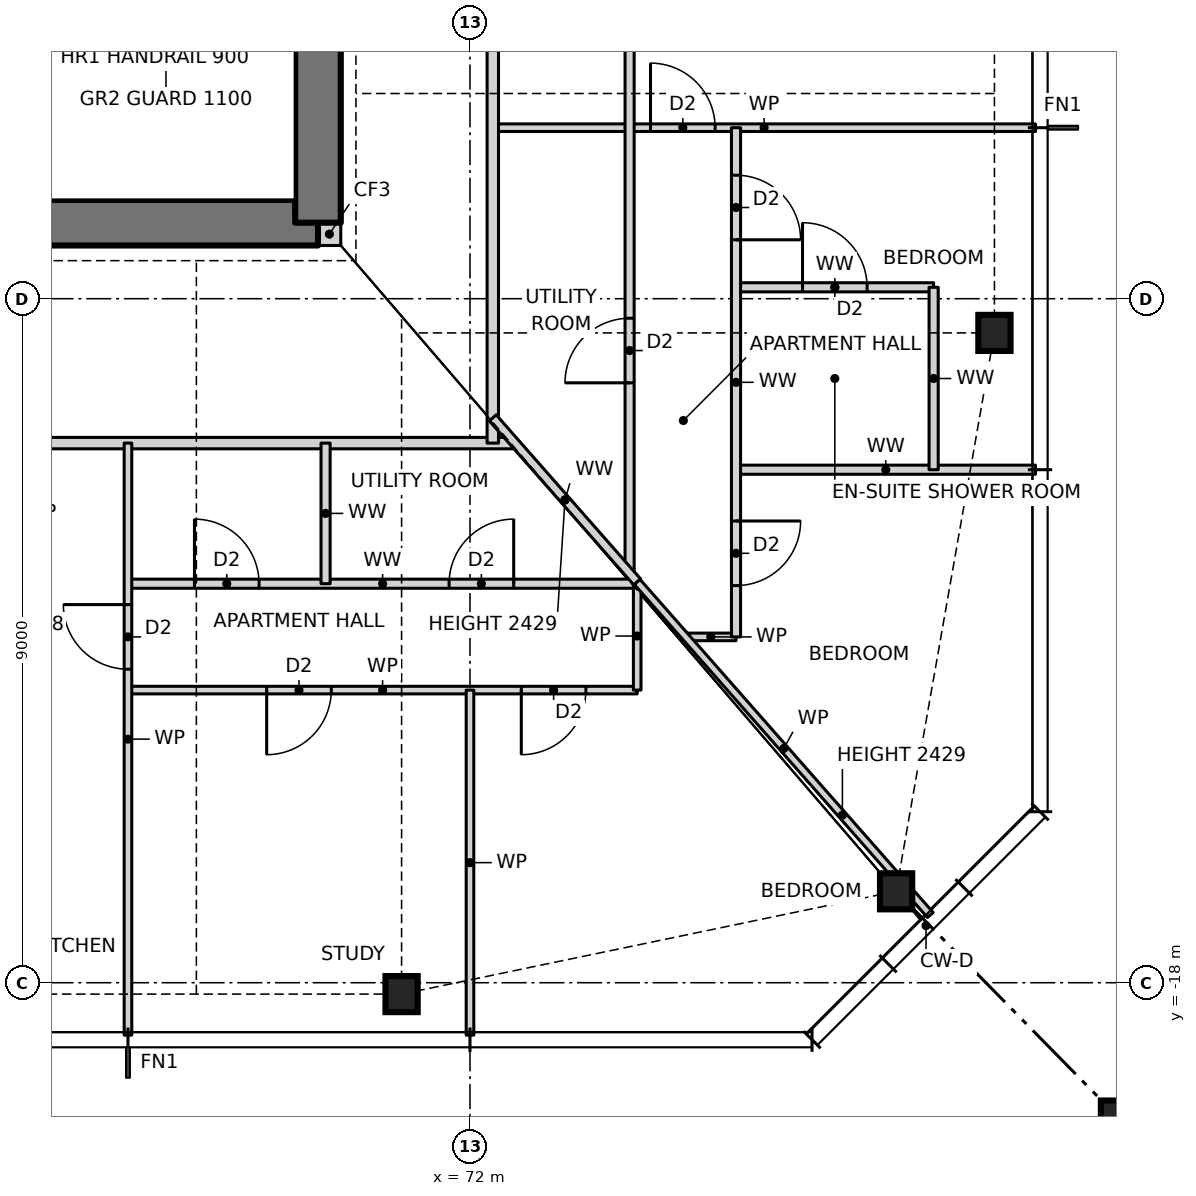
"""IFC4 building model, lengths in metres.
Left out: names, types, materials, properties, quantities, classifications, styles, units other than length and angle.
Written with IfcOpenShell. Run it as: python <this file> out.ifc"""

import sys

from ifc_helpers import new_model, si_unit, direction, frame, frame_2d, origin, origin_2d, place, context, subcontext, project, spatial, rectangle, hollow_rectangle, i_section, extrude, element, fill, save


model = new_model("IFC4")
c1 = context("Model", 3, precision=1e-05, world=origin(), true_north=direction((0.0, 1.0)))
c2 = subcontext(c1, "Body", "Model", "MODEL_VIEW")
j1 = project(units=[si_unit("LENGTHUNIT", "METRE"), si_unit("PLANEANGLEUNIT", "RADIAN")], contexts=[c1])
p1 = place(None, origin())
s1 = spatial("IfcSite", under=j1, at=p1, CompositionType="ELEMENT")
p2 = place(p1, origin())
s2 = spatial("IfcBuilding", under=s1, at=p2, CompositionType="ELEMENT")
p3 = place(p2, frame((0.0, 0.0, 60.5)))
s3 = spatial("IfcBuildingStorey", under=s2, at=p3, CompositionType="ELEMENT", Elevation=60.5)
for number, where, z_axis, x_axis in (
    (1, (71.1, -18.15, 0.0), (0.0, 0.0, 1.0), (1.0, 0.0, 0.0)),
    (2, (77.606, -16.797, 0.0), (0.0, 0.0, 1.0), (1.0, 0.0, 0.0)),
    (3, (78.9, -9.45, 0.0), (0.0, 0.0, 1.0), (1.0, 0.0, 0.0)),
):
    element("IfcColumn", number, at=place(p3, frame(where, z_axis=z_axis, x_axis=x_axis)), inside=s3, PredefinedType="COLUMN", context=c2, shape_type="SweptSolid", body=[
        extrude(i_section(OverallWidth=0.424, OverallDepth=0.475, WebThickness=0.048, FlangeThickness=0.077, at=origin_2d()), origin(), (0.0, 0.0, 1.0), 3.5),
    ])
p4 = place(p3, frame((80.9, -20.15, 0.0), z_axis=(0.0, 0.0, 1.0), x_axis=(1.0, 0.0, 0.0)))
e4 = element("IfcColumn", 4, at=p4, inside=s3, PredefinedType="COLUMN", context=c2, shape_type="SweptSolid", body=[
    extrude(hollow_rectangle(XDim=1.2, YDim=1.2, WallThickness=0.07, at=origin_2d()), origin(), (0.0, 0.0, 1.0), 3.5),
])
p5 = place(p3, frame((70.0, -8.15, 0.0), z_axis=(0.0, 0.0, 1.0), x_axis=(1.0, 0.0, 0.0)))
e5 = element("IfcWall", 5, at=p5, inside=s3, PredefinedType="SOLIDWALL", context=c2, shape_type="SweptSolid", body=[
    extrude(rectangle(XDim=0.3, YDim=0.3, at=frame_2d((0.15, 0.0))), origin(), (0.0, 0.0, 1.0), 3.5),
])
p6 = place(p3, frame((56.0, -8.0, 0.0), z_axis=(0.0, 0.0, 1.0), x_axis=(1.0, 0.0, 0.0)))
e6 = element("IfcWall", 6, at=p6, inside=s3, PredefinedType="SHEAR", context=c2, shape_type="SweptSolid", body=[
    extrude(rectangle(XDim=14.0, YDim=0.6, at=frame_2d((7.0, 0.0))), origin(), (0.0, 0.0, 1.0), 3.5),
])
p7 = place(p6, frame((2.7, 0.0, 0.0)))
e7 = element("IfcOpeningElement", 7, at=p7, cuts=e6, PredefinedType="OPENING", context=c2, shape_type="SweptSolid", body=[
    extrude(rectangle(XDim=0.9, YDim=2.1, at=frame_2d((0.45, 1.05))), frame((0.0, 0.31, 0.0), z_axis=(0.0, -1.0, 0.0), x_axis=(1.0, 0.0, 0.0)), (0.0, 0.0, 1.0), 0.62),
])
p8 = place(p6, frame((7.7, 0.0, 0.0)))
e8 = element("IfcOpeningElement", 8, at=p8, cuts=e6, PredefinedType="OPENING", context=c2, shape_type="SweptSolid", body=[
    extrude(rectangle(XDim=0.9, YDim=2.1, at=frame_2d((0.45, 1.05))), frame((0.0, 0.31, 0.0), z_axis=(0.0, -1.0, 0.0), x_axis=(1.0, 0.0, 0.0)), (0.0, 0.0, 1.0), 0.62),
])
p9 = place(p3, frame((70.0, -8.0, 0.0), z_axis=(0.0, 0.0, 1.0), x_axis=(0.0, 1.0, 0.0)))
e9 = element("IfcWall", 9, at=p9, inside=s3, PredefinedType="SHEAR", context=c2, shape_type="SweptSolid", body=[
    extrude(rectangle(XDim=16.0, YDim=0.6, at=frame_2d((8.0, 0.0))), origin(), (0.0, 0.0, 1.0), 3.5),
])
p10 = place(p9, frame((7.5, 0.0, 0.0)))
e10 = element("IfcOpeningElement", 10, at=p10, cuts=e9, PredefinedType="OPENING", context=c2, shape_type="SweptSolid", body=[
    extrude(rectangle(XDim=1.0, YDim=2.1, at=frame_2d((0.5, 1.05))), frame((0.0, 0.31, 0.0), z_axis=(0.0, -1.0, 0.0), x_axis=(1.0, 0.0, 0.0)), (0.0, 0.0, 1.0), 0.62),
])
p11 = place(p3, frame((67.5, -14.15, 0.0), z_axis=(0.0, 0.0, 1.0), x_axis=(1.0, 0.0, 0.0)))
e11 = element("IfcWall", 11, at=p11, inside=s3, PredefinedType="PARTITIONING", context=c2, shape_type="SweptSolid", body=[
    extrude(rectangle(XDim=6.7, YDim=0.1, at=frame_2d((3.35, 0.0))), origin(), (0.0, 0.0, 1.0), 3.27),
])
p12 = place(p11, frame((1.825, 0.0, 0.0)))
e12 = element("IfcOpeningElement", 12, at=p12, cuts=e11, PredefinedType="OPENING", context=c2, shape_type="SweptSolid", body=[
    extrude(rectangle(XDim=0.85, YDim=2.1, at=frame_2d((0.425, 1.05))), frame((0.0, 0.06, 0.0), z_axis=(0.0, -1.0, 0.0), x_axis=(1.0, 0.0, 0.0)), (0.0, 0.0, 1.0), 0.12),
])
p13 = place(p11, frame((5.175, 0.0, 0.0)))
e13 = element("IfcOpeningElement", 13, at=p13, cuts=e11, PredefinedType="OPENING", context=c2, shape_type="SweptSolid", body=[
    extrude(rectangle(XDim=0.85, YDim=2.1, at=frame_2d((0.425, 1.05))), frame((0.0, 0.06, 0.0), z_axis=(0.0, -1.0, 0.0), x_axis=(1.0, 0.0, 0.0)), (0.0, 0.0, 1.0), 0.12),
])
p14 = place(p3, frame((74.836, -13.45, 0.0), z_axis=(0.0, 0.0, 1.0), x_axis=(1.0, 0.0, 0.0)))
e14 = element("IfcWall", 14, at=p14, inside=s3, PredefinedType="PARTITIONING", context=c2, shape_type="SweptSolid", body=[
    extrude(rectangle(XDim=0.664, YDim=0.1, at=frame_2d((0.332, 0.0))), origin(), (0.0, 0.0, 1.0), 3.27),
])
p15 = place(p3, frame((67.5, -12.75, 0.0), z_axis=(0.0, 0.0, 1.0), x_axis=(1.0, 0.0, 0.0)))
e15 = element("IfcWall", 15, at=p15, inside=s3, PredefinedType="PARTITIONING", context=c2, shape_type="SweptSolid", body=[
    extrude(rectangle(XDim=6.7, YDim=0.12, at=frame_2d((3.35, 0.0))), origin(), (0.0, 0.0, 1.0), 3.27),
])
p16 = place(p15, frame((0.875, 0.0, 0.0)))
e16 = element("IfcOpeningElement", 16, at=p16, cuts=e15, PredefinedType="OPENING", context=c2, shape_type="SweptSolid", body=[
    extrude(rectangle(XDim=0.85, YDim=2.1, at=frame_2d((0.425, 1.05))), frame((0.0, 0.07, 0.0), z_axis=(0.0, -1.0, 0.0), x_axis=(1.0, 0.0, 0.0)), (0.0, 0.0, 1.0), 0.14),
])
p17 = place(p15, frame((4.225, 0.0, 0.0)))
e17 = element("IfcOpeningElement", 17, at=p17, cuts=e15, PredefinedType="OPENING", context=c2, shape_type="SweptSolid", body=[
    extrude(rectangle(XDim=0.85, YDim=2.1, at=frame_2d((0.425, 1.05))), frame((0.0, 0.07, 0.0), z_axis=(0.0, -1.0, 0.0), x_axis=(1.0, 0.0, 0.0)), (0.0, 0.0, 1.0), 0.14),
])
p18 = place(p3, frame((75.5, -11.25, 0.0), z_axis=(0.0, 0.0, 1.0), x_axis=(1.0, 0.0, 0.0)))
e18 = element("IfcWall", 18, at=p18, inside=s3, PredefinedType="PARTITIONING", context=c2, shape_type="SweptSolid", body=[
    extrude(rectangle(XDim=3.94, YDim=0.12, at=frame_2d((1.97, 0.0))), origin(), (0.0, 0.0, 1.0), 3.27),
])
p19 = place(p3, frame((53.408, -10.9, 0.0), z_axis=(0.0, 0.0, 1.0), x_axis=(1.0, 0.0, 0.0)))
e19 = element("IfcWall", 19, at=p19, inside=s3, PredefinedType="PARTITIONING", context=c2, shape_type="SweptSolid", body=[
    extrude(rectangle(XDim=19.184, YDim=0.15, at=frame_2d((9.592, 0.0))), origin(), (0.0, 0.0, 1.0), 3.27),
])
p20 = place(p19, frame((5.092, 0.0, 0.0)))
e20 = element("IfcOpeningElement", 20, at=p20, cuts=e19, PredefinedType="OPENING", context=c2, shape_type="SweptSolid", body=[
    extrude(rectangle(XDim=1.0, YDim=2.1, at=frame_2d((0.5, 1.05))), frame((0.0, 0.085, 0.0), z_axis=(0.0, -1.0, 0.0), x_axis=(1.0, 0.0, 0.0)), (0.0, 0.0, 1.0), 0.17),
])
p21 = place(p19, frame((10.492, 0.0, 0.0)))
e21 = element("IfcOpeningElement", 21, at=p21, cuts=e19, PredefinedType="OPENING", context=c2, shape_type="SweptSolid", body=[
    extrude(rectangle(XDim=1.0, YDim=2.1, at=frame_2d((0.5, 1.05))), frame((0.0, 0.085, 0.0), z_axis=(0.0, -1.0, 0.0), x_axis=(1.0, 0.0, 0.0)), (0.0, 0.0, 1.0), 0.17),
])
p22 = place(p3, frame((75.5, -8.85, 0.0), z_axis=(0.0, 0.0, 1.0), x_axis=(1.0, 0.0, 0.0)))
e22 = element("IfcWall", 22, at=p22, inside=s3, PredefinedType="PARTITIONING", context=c2, shape_type="SweptSolid", body=[
    extrude(rectangle(XDim=2.6, YDim=0.12, at=frame_2d((1.3, 0.0))), origin(), (0.0, 0.0, 1.0), 3.27),
])
p23 = place(p22, frame((0.875, 0.0, 0.0)))
e23 = element("IfcOpeningElement", 23, at=p23, cuts=e22, PredefinedType="OPENING", context=c2, shape_type="SweptSolid", body=[
    extrude(rectangle(XDim=0.85, YDim=2.1, at=frame_2d((0.425, 1.05))), frame((0.0, 0.07, 0.0), z_axis=(0.0, -1.0, 0.0), x_axis=(1.0, 0.0, 0.0)), (0.0, 0.0, 1.0), 0.14),
])
p24 = place(p3, frame((72.3, -6.75, 0.0), z_axis=(0.0, 0.0, 1.0), x_axis=(1.0, 0.0, 0.0)))
e24 = element("IfcWall", 24, at=p24, inside=s3, PredefinedType="PARTITIONING", context=c2, shape_type="SweptSolid", body=[
    extrude(rectangle(XDim=7.14, YDim=0.1, at=frame_2d((3.57, 0.0))), origin(), (0.0, 0.0, 1.0), 3.27),
])
p25 = place(p24, frame((2.075, 0.0, 0.0)))
e25 = element("IfcOpeningElement", 25, at=p25, cuts=e24, PredefinedType="OPENING", context=c2, shape_type="SweptSolid", body=[
    extrude(rectangle(XDim=0.85, YDim=2.1, at=frame_2d((0.425, 1.05))), frame((0.0, 0.06, 0.0), z_axis=(0.0, -1.0, 0.0), x_axis=(1.0, 0.0, 0.0)), (0.0, 0.0, 1.0), 0.12),
])
p26 = place(p3, frame((78.1, -11.25, 0.0), z_axis=(0.0, 0.0, 1.0), x_axis=(0.0, 1.0, 0.0)))
e26 = element("IfcWall", 26, at=p26, inside=s3, PredefinedType="PARTITIONING", context=c2, shape_type="SweptSolid", body=[
    extrude(rectangle(XDim=2.4, YDim=0.12, at=frame_2d((1.2, 0.0))), origin(), (0.0, 0.0, 1.0), 3.27),
])
p27 = place(p3, frame((75.5, -13.45, 0.0), z_axis=(0.0, 0.0, 1.0), x_axis=(0.0, 1.0, 0.0)))
e27 = element("IfcWall", 27, at=p27, inside=s3, PredefinedType="PARTITIONING", context=c2, shape_type="SweptSolid", body=[
    extrude(rectangle(XDim=6.7, YDim=0.12, at=frame_2d((3.35, 0.0))), origin(), (0.0, 0.0, 1.0), 3.27),
])
p28 = place(p27, frame((5.225, 0.0, 0.0)))
e28 = element("IfcOpeningElement", 28, at=p28, cuts=e27, PredefinedType="OPENING", context=c2, shape_type="SweptSolid", body=[
    extrude(rectangle(XDim=0.85, YDim=2.1, at=frame_2d((0.425, 1.05))), frame((0.0, 0.07, 0.0), z_axis=(0.0, -1.0, 0.0), x_axis=(1.0, 0.0, 0.0)), (0.0, 0.0, 1.0), 0.14),
])
p29 = place(p27, frame((0.675, 0.0, 0.0)))
e29 = element("IfcOpeningElement", 29, at=p29, cuts=e27, PredefinedType="OPENING", context=c2, shape_type="SweptSolid", body=[
    extrude(rectangle(XDim=0.85, YDim=2.1, at=frame_2d((0.425, 1.05))), frame((0.0, 0.07, 0.0), z_axis=(0.0, -1.0, 0.0), x_axis=(1.0, 0.0, 0.0)), (0.0, 0.0, 1.0), 0.14),
])
p30 = place(p3, frame((74.2, -14.15, 0.0), z_axis=(0.0, 0.0, 1.0), x_axis=(0.0, 1.0, 0.0)))
e30 = element("IfcWall", 30, at=p30, inside=s3, PredefinedType="PARTITIONING", context=c2, shape_type="SweptSolid", body=[
    extrude(rectangle(XDim=1.423, YDim=0.1, at=frame_2d((0.711, 0.0))), origin(), (0.0, 0.0, 1.0), 3.27),
])
p31 = place(p3, frame((74.1, -12.614, 0.0), z_axis=(0.0, 0.0, 1.0), x_axis=(0.0, 1.0, 0.0)))
e31 = element("IfcWall", 31, at=p31, inside=s3, PredefinedType="PARTITIONING", context=c2, shape_type="SweptSolid", body=[
    extrude(rectangle(XDim=25.228, YDim=0.12, at=frame_2d((12.614, 0.0))), origin(), (0.0, 0.0, 1.0), 3.27),
])
p32 = place(p31, frame((7.239, 0.0, 0.0)))
e32 = element("IfcOpeningElement", 32, at=p32, cuts=e31, PredefinedType="OPENING", context=c2, shape_type="SweptSolid", body=[
    extrude(rectangle(XDim=0.85, YDim=2.1, at=frame_2d((0.425, 1.05))), frame((0.0, 0.07, 0.0), z_axis=(0.0, -1.0, 0.0), x_axis=(1.0, 0.0, 0.0)), (0.0, 0.0, 1.0), 0.14),
])
p33 = place(p31, frame((10.439, 0.0, 0.0)))
e33 = element("IfcOpeningElement", 33, at=p33, cuts=e31, PredefinedType="OPENING", context=c2, shape_type="SweptSolid", body=[
    extrude(rectangle(XDim=0.85, YDim=2.1, at=frame_2d((0.425, 1.05))), frame((0.0, 0.07, 0.0), z_axis=(0.0, -1.0, 0.0), x_axis=(1.0, 0.0, 0.0)), (0.0, 0.0, 1.0), 0.14),
])
p34 = place(p31, frame((2.507, 0.0, 0.0)))
e34 = element("IfcOpeningElement", 34, at=p34, cuts=e31, PredefinedType="OPENING", context=c2, shape_type="SweptSolid", body=[
    extrude(rectangle(XDim=0.85, YDim=2.1, at=frame_2d((0.425, 1.05))), frame((0.0, 0.07, 0.0), z_axis=(0.0, -1.0, 0.0), x_axis=(1.0, 0.0, 0.0)), (0.0, 0.0, 1.0), 0.14),
])
p35 = place(p31, frame((16.639, 0.0, 0.0)))
e35 = element("IfcOpeningElement", 35, at=p35, cuts=e31, PredefinedType="OPENING", context=c2, shape_type="SweptSolid", body=[
    extrude(rectangle(XDim=0.85, YDim=2.1, at=frame_2d((0.425, 1.05))), frame((0.0, 0.07, 0.0), z_axis=(0.0, -1.0, 0.0), x_axis=(1.0, 0.0, 0.0)), (0.0, 0.0, 1.0), 0.14),
])
p36 = place(p31, frame((21.821, 0.0, 0.0)))
e36 = element("IfcOpeningElement", 36, at=p36, cuts=e31, PredefinedType="OPENING", context=c2, shape_type="SweptSolid", body=[
    extrude(rectangle(XDim=0.85, YDim=2.1, at=frame_2d((0.425, 1.05))), frame((0.0, 0.07, 0.0), z_axis=(0.0, -1.0, 0.0), x_axis=(1.0, 0.0, 0.0)), (0.0, 0.0, 1.0), 0.14),
])
p37 = place(p3, frame((72.3, -10.9, 0.0), z_axis=(0.0, 0.0, 1.0), x_axis=(0.0, 1.0, 0.0)))
e37 = element("IfcWall", 37, at=p37, inside=s3, PredefinedType="PARTITIONING", context=c2, shape_type="SweptSolid", body=[
    extrude(rectangle(XDim=21.468, YDim=0.15, at=frame_2d((10.734, 0.0))), origin(), (0.0, 0.0, 1.0), 3.27),
])
p38 = place(p37, frame((8.65, 0.0, 0.0)))
e38 = element("IfcOpeningElement", 38, at=p38, cuts=e37, PredefinedType="OPENING", context=c2, shape_type="SweptSolid", body=[
    extrude(rectangle(XDim=1.0, YDim=2.1, at=frame_2d((0.5, 1.05))), frame((0.0, 0.085, 0.0), z_axis=(0.0, -1.0, 0.0), x_axis=(1.0, 0.0, 0.0)), (0.0, 0.0, 1.0), 0.17),
])
p39 = place(p3, frame((72.0, -18.69, 0.0), z_axis=(0.0, 0.0, 1.0), x_axis=(0.0, 1.0, 0.0)))
e39 = element("IfcWall", 39, at=p39, inside=s3, PredefinedType="PARTITIONING", context=c2, shape_type="SweptSolid", body=[
    extrude(rectangle(XDim=4.54, YDim=0.1, at=frame_2d((2.27, 0.0))), origin(), (0.0, 0.0, 1.0), 3.27),
])
p40 = place(p3, frame((70.1, -12.75, 0.0), z_axis=(0.0, 0.0, 1.0), x_axis=(0.0, 1.0, 0.0)))
e40 = element("IfcWall", 40, at=p40, inside=s3, PredefinedType="PARTITIONING", context=c2, shape_type="SweptSolid", body=[
    extrude(rectangle(XDim=1.85, YDim=0.12, at=frame_2d((0.925, 0.0))), origin(), (0.0, 0.0, 1.0), 3.27),
])
p41 = place(p3, frame((67.5, -18.69, 0.0), z_axis=(0.0, 0.0, 1.0), x_axis=(0.0, 1.0, 0.0)))
e41 = element("IfcWall", 41, at=p41, inside=s3, PredefinedType="PARTITIONING", context=c2, shape_type="SweptSolid", body=[
    extrude(rectangle(XDim=7.79, YDim=0.1, at=frame_2d((3.895, 0.0))), origin(), (0.0, 0.0, 1.0), 3.27),
])
p42 = place(p41, frame((4.815, 0.0, 0.0)))
e42 = element("IfcOpeningElement", 42, at=p42, cuts=e41, PredefinedType="OPENING", context=c2, shape_type="SweptSolid", body=[
    extrude(rectangle(XDim=0.85, YDim=2.1, at=frame_2d((0.425, 1.05))), frame((0.0, 0.06, 0.0), z_axis=(0.0, -1.0, 0.0), x_axis=(1.0, 0.0, 0.0)), (0.0, 0.0, 1.0), 0.12),
])
p43 = place(p3, frame((74.2, -12.727, 0.0), z_axis=(0.0, 0.0, 1.0), x_axis=(-0.66059344937, 0.75074382758, 0.0)))
e43 = element("IfcWall", 43, at=p43, inside=s3, PredefinedType="PARTITIONING", context=c2, shape_type="SweptSolid", body=[
    extrude(rectangle(XDim=2.876, YDim=0.12, at=frame_2d((1.438, 0.0))), origin(), (0.0, 0.0, 1.0), 2.429),
])
p44 = place(p3, frame((78.057, -17.109, 0.0), z_axis=(0.0, 0.0, 1.0), x_axis=(-0.660654290516, 0.750690287951, 0.0)))
e44 = element("IfcWall", 44, at=p44, inside=s3, PredefinedType="PARTITIONING", context=c2, shape_type="SweptSolid", body=[
    extrude(rectangle(XDim=5.838, YDim=0.1, at=frame_2d((2.919, 0.0))), origin(), (0.0, 0.0, 1.0), 2.429),
])
p45 = place(p42, origin())
e45 = element("IfcDoor", 45, at=p45, inside=s3, OperationType="SINGLE_SWING_RIGHT", PredefinedType="DOOR", context=c2, shape_type="SweptSolid", body=[
    extrude(rectangle(XDim=0.85, YDim=2.1, at=frame_2d((0.425, 1.05))), frame((0.0, 0.025, 0.0), z_axis=(0.0, -1.0, 0.0), x_axis=(1.0, 0.0, 0.0)), (0.0, 0.0, 1.0), 0.05),
])
fill(e42, e45)
p46 = place(p12, frame((0.85, 0.0, 0.0), z_axis=(0.0, 0.0, 1.0), x_axis=(-1.0, 0.0, 0.0)))
e46 = element("IfcDoor", 46, at=p46, inside=s3, OperationType="SINGLE_SWING_RIGHT", PredefinedType="DOOR", context=c2, shape_type="SweptSolid", body=[
    extrude(rectangle(XDim=0.85, YDim=2.1, at=frame_2d((0.425, 1.05))), frame((0.0, 0.025, 0.0), z_axis=(0.0, -1.0, 0.0), x_axis=(1.0, 0.0, 0.0)), (0.0, 0.0, 1.0), 0.05),
])
fill(e12, e46)
p47 = place(p13, frame((0.85, 0.0, 0.0), z_axis=(0.0, 0.0, 1.0), x_axis=(-1.0, 0.0, 0.0)))
e47 = element("IfcDoor", 47, at=p47, inside=s3, OperationType="SINGLE_SWING_RIGHT", PredefinedType="DOOR", context=c2, shape_type="SweptSolid", body=[
    extrude(rectangle(XDim=0.85, YDim=2.1, at=frame_2d((0.425, 1.05))), frame((0.0, 0.025, 0.0), z_axis=(0.0, -1.0, 0.0), x_axis=(1.0, 0.0, 0.0)), (0.0, 0.0, 1.0), 0.05),
])
fill(e13, e47)
p48 = place(p16, origin())
e48 = element("IfcDoor", 48, at=p48, inside=s3, OperationType="SINGLE_SWING_LEFT", PredefinedType="DOOR", context=c2, shape_type="SweptSolid", body=[
    extrude(rectangle(XDim=0.85, YDim=2.1, at=frame_2d((0.425, 1.05))), frame((0.0, 0.025, 0.0), z_axis=(0.0, -1.0, 0.0), x_axis=(1.0, 0.0, 0.0)), (0.0, 0.0, 1.0), 0.05),
])
fill(e16, e48)
p49 = place(p17, origin())
e49 = element("IfcDoor", 49, at=p49, inside=s3, OperationType="SINGLE_SWING_RIGHT", PredefinedType="DOOR", context=c2, shape_type="SweptSolid", body=[
    extrude(rectangle(XDim=0.85, YDim=2.1, at=frame_2d((0.425, 1.05))), frame((0.0, 0.025, 0.0), z_axis=(0.0, -1.0, 0.0), x_axis=(1.0, 0.0, 0.0)), (0.0, 0.0, 1.0), 0.05),
])
fill(e17, e49)
p50 = place(p25, origin())
e50 = element("IfcDoor", 50, at=p50, inside=s3, OperationType="SINGLE_SWING_LEFT", PredefinedType="DOOR", context=c2, shape_type="SweptSolid", body=[
    extrude(rectangle(XDim=0.85, YDim=2.1, at=frame_2d((0.425, 1.05))), frame((0.0, 0.025, 0.0), z_axis=(0.0, -1.0, 0.0), x_axis=(1.0, 0.0, 0.0)), (0.0, 0.0, 1.0), 0.05),
])
fill(e25, e50)
p51 = place(p23, origin())
e51 = element("IfcDoor", 51, at=p51, inside=s3, OperationType="SINGLE_SWING_LEFT", PredefinedType="DOOR", context=c2, shape_type="SweptSolid", body=[
    extrude(rectangle(XDim=0.85, YDim=2.1, at=frame_2d((0.425, 1.05))), frame((0.0, 0.025, 0.0), z_axis=(0.0, -1.0, 0.0), x_axis=(1.0, 0.0, 0.0)), (0.0, 0.0, 1.0), 0.05),
])
fill(e23, e51)
p52 = place(p28, frame((0.85, 0.0, 0.0), z_axis=(0.0, 0.0, 1.0), x_axis=(-1.0, 0.0, 0.0)))
e52 = element("IfcDoor", 52, at=p52, inside=s3, OperationType="SINGLE_SWING_RIGHT", PredefinedType="DOOR", context=c2, shape_type="SweptSolid", body=[
    extrude(rectangle(XDim=0.85, YDim=2.1, at=frame_2d((0.425, 1.05))), frame((0.0, 0.025, 0.0), z_axis=(0.0, -1.0, 0.0), x_axis=(1.0, 0.0, 0.0)), (0.0, 0.0, 1.0), 0.05),
])
fill(e28, e52)
p53 = place(p29, frame((0.85, 0.0, 0.0), z_axis=(0.0, 0.0, 1.0), x_axis=(-1.0, 0.0, 0.0)))
e53 = element("IfcDoor", 53, at=p53, inside=s3, OperationType="SINGLE_SWING_LEFT", PredefinedType="DOOR", context=c2, shape_type="SweptSolid", body=[
    extrude(rectangle(XDim=0.85, YDim=2.1, at=frame_2d((0.425, 1.05))), frame((0.0, 0.025, 0.0), z_axis=(0.0, -1.0, 0.0), x_axis=(1.0, 0.0, 0.0)), (0.0, 0.0, 1.0), 0.05),
])
fill(e29, e53)
p54 = place(p34, origin())
e54 = element("IfcDoor", 54, at=p54, inside=s3, OperationType="SINGLE_SWING_LEFT", PredefinedType="DOOR", context=c2, shape_type="SweptSolid", body=[
    extrude(rectangle(XDim=0.85, YDim=2.1, at=frame_2d((0.425, 1.05))), frame((0.0, 0.025, 0.0), z_axis=(0.0, -1.0, 0.0), x_axis=(1.0, 0.0, 0.0)), (0.0, 0.0, 1.0), 0.05),
])
fill(e34, e54)
save(model, sys.argv[1])
